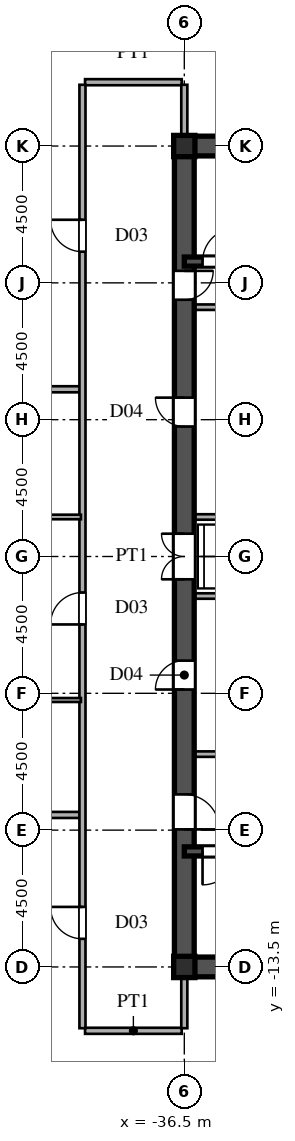
"""IFC4 building model, lengths in metres.
Left out: names, types, materials, properties, quantities, classifications, styles, units other than length and angle.
Written with IfcOpenShell. Run it as: python <this file> out.ifc"""

import sys

from ifc_helpers import new_model, si_unit, direction, frame, frame_2d, origin, origin_2d, place, context, subcontext, project, spatial, rectangle, i_section, extrude, source, transform, mapped, element, fill, save


model = new_model("IFC4")
c1 = context("Model", 3, precision=1e-05, world=origin(), true_north=direction((0.0, 1.0)))
c2 = subcontext(c1, "Body", "Model", "MODEL_VIEW")
j1 = project(units=[si_unit("LENGTHUNIT", "METRE"), si_unit("PLANEANGLEUNIT", "RADIAN")], contexts=[c1])
p1 = place(None, origin())
s1 = spatial("IfcSite", under=j1, at=p1, CompositionType="ELEMENT")
p2 = place(p1, origin())
s2 = spatial("IfcBuilding", under=s1, at=p2, CompositionType="ELEMENT")
p3 = place(p2, frame((0.0, 0.0, 132.0)))
s3 = spatial("IfcBuildingStorey", under=s2, at=p3, CompositionType="ELEMENT", Elevation=132.0)
m1 = source(origin(), c2, "Body", "SweptSolid", [
    extrude(i_section(OverallWidth=0.7, OverallDepth=0.7, WebThickness=0.028, FlangeThickness=0.045, at=origin_2d()), origin(), (0.0, 0.0, 1.0), 3.6),
])
for number, where, z_axis, x_axis in (
    (1, (-36.5, -13.5, 0.0), (0.0, 0.0, 1.0), (1.0, 0.0, 0.0)),
    (2, (-36.5, 13.5, 0.0), (0.0, 0.0, 1.0), (1.0, 0.0, 0.0)),
):
    element("IfcColumn", number, at=place(p3, frame(where, z_axis=z_axis, x_axis=x_axis)), inside=s3, PredefinedType="COLUMN", context=c2, shape_type="MappedRepresentation", body=[
        mapped(m1, transform((0.0, 0.0, 0.0), scale=1.0)),
    ])
for number, where, z_axis, x_axis in (
    (3, (-36.5, -13.5, 0.0), (0.0, 0.0, 1.0), (1.0, 0.0, 0.0)),
    (4, (-36.5, 13.5, 0.0), (0.0, 0.0, 1.0), (1.0, 0.0, 0.0)),
):
    element("IfcWall", number, at=place(p3, frame(where, z_axis=z_axis, x_axis=x_axis)), inside=s3, PredefinedType="SHEAR", context=c2, shape_type="SweptSolid", body=[
        extrude(rectangle(XDim=9.0, YDim=0.65, at=frame_2d((4.5, 0.0))), origin(), (0.0, 0.0, 1.0), 3.34),
    ])
p4 = place(p3, frame((-36.5, -13.65, 0.0), z_axis=(0.0, 0.0, 1.0), x_axis=(0.0, 1.0, 0.0)))
e5 = element("IfcWall", 5, at=p4, inside=s3, PredefinedType="SHEAR", context=c2, shape_type="SweptSolid", body=[
    extrude(rectangle(XDim=7.15, YDim=0.65, at=frame_2d((3.575, 0.0))), origin(), (0.0, 0.0, 1.0), 3.34),
])
p5 = place(p4, frame((4.675, 0.0, 0.0)))
e6 = element("IfcOpeningElement", 6, at=p5, cuts=e5, PredefinedType="OPENING", context=c2, shape_type="SweptSolid", body=[
    extrude(rectangle(XDim=1.15, YDim=2.2, at=frame_2d((0.575, 1.1))), frame((0.0, 0.335, 0.0), z_axis=(0.0, -1.0, 0.0), x_axis=(1.0, 0.0, 0.0)), (0.0, 0.0, 1.0), 0.67),
])
p6 = place(p3, frame((-36.5, -1.3, 0.0), z_axis=(0.0, 0.0, 1.0), x_axis=(0.0, 1.0, 0.0)))
e7 = element("IfcWall", 7, at=p6, inside=s3, PredefinedType="SHEAR", context=c2, shape_type="SweptSolid", body=[
    extrude(rectangle(XDim=2.6, YDim=0.65, at=frame_2d((1.3, 0.0))), origin(), (0.0, 0.0, 1.0), 3.34),
])
p7 = place(p6, frame((0.55, 0.0, 0.0)))
e8 = element("IfcOpeningElement", 8, at=p7, cuts=e7, PredefinedType="OPENING", context=c2, shape_type="SweptSolid", body=[
    extrude(rectangle(XDim=1.5, YDim=2.3, at=frame_2d((0.75, 1.15))), frame((0.0, 0.335, 0.0), z_axis=(0.0, -1.0, 0.0), x_axis=(1.0, 0.0, 0.0)), (0.0, 0.0, 1.0), 0.67),
])
p8 = place(p3, frame((-36.5, 8.2, 0.0), z_axis=(0.0, 0.0, 1.0), x_axis=(0.0, 1.0, 0.0)))
e9 = element("IfcWall", 9, at=p8, inside=s3, PredefinedType="SHEAR", context=c2, shape_type="SweptSolid", body=[
    extrude(rectangle(XDim=5.45, YDim=0.65, at=frame_2d((2.725, 0.0))), origin(), (0.0, 0.0, 1.0), 3.34),
])
p9 = place(p8, frame((0.245, 0.0, 0.0)))
e10 = element("IfcOpeningElement", 10, at=p9, cuts=e9, PredefinedType="OPENING", context=c2, shape_type="SweptSolid", body=[
    extrude(rectangle(XDim=0.95, YDim=2.15, at=frame_2d((0.475, 1.075))), frame((0.0, 0.335, 0.0), z_axis=(0.0, -1.0, 0.0), x_axis=(1.0, 0.0, 0.0)), (0.0, 0.0, 1.0), 0.67),
])
p10 = place(p3, frame((-36.5, -6.5, 0.0), z_axis=(0.0, 0.0, 1.0), x_axis=(0.0, 1.0, 0.0)))
e11 = element("IfcWall", 11, at=p10, inside=s3, PredefinedType="SHEAR", context=c2, shape_type="SweptSolid", body=[
    extrude(rectangle(XDim=5.2, YDim=0.65, at=frame_2d((2.6, 0.0))), origin(), (0.0, 0.0, 1.0), 3.34),
])
p11 = place(p10, frame((2.125, 0.0, 0.0)))
e12 = element("IfcOpeningElement", 12, at=p11, cuts=e11, PredefinedType="OPENING", context=c2, shape_type="SweptSolid", body=[
    extrude(rectangle(XDim=0.95, YDim=2.15, at=frame_2d((0.475, 1.075))), frame((0.0, 0.335, 0.0), z_axis=(0.0, -1.0, 0.0), x_axis=(1.0, 0.0, 0.0)), (0.0, 0.0, 1.0), 0.67),
])
p12 = place(p3, frame((-36.5, 1.3, 0.0), z_axis=(0.0, 0.0, 1.0), x_axis=(0.0, 1.0, 0.0)))
e13 = element("IfcWall", 13, at=p12, inside=s3, PredefinedType="SHEAR", context=c2, shape_type="SweptSolid", body=[
    extrude(rectangle(XDim=6.9, YDim=0.65, at=frame_2d((3.45, 0.0))), origin(), (0.0, 0.0, 1.0), 3.34),
])
p13 = place(p12, frame((2.975, 0.0, 0.0)))
e14 = element("IfcOpeningElement", 14, at=p13, cuts=e13, PredefinedType="OPENING", context=c2, shape_type="SweptSolid", body=[
    extrude(rectangle(XDim=0.95, YDim=2.15, at=frame_2d((0.475, 1.075))), frame((0.0, 0.335, 0.0), z_axis=(0.0, -1.0, 0.0), x_axis=(1.0, 0.0, 0.0)), (0.0, 0.0, 1.0), 0.67),
])
p14 = place(p3, frame((-36.5, -9.7, 0.0), z_axis=(0.0, 0.0, 1.0), x_axis=(1.0, 0.0, 0.0)))
e15 = element("IfcWall", 15, at=p14, inside=s3, PredefinedType="SHEAR", context=c2, shape_type="SweptSolid", body=[
    extrude(rectangle(XDim=9.0, YDim=0.3, at=frame_2d((4.5, 0.0))), origin(), (0.0, 0.0, 1.0), 3.34),
])
p15 = place(p14, frame((0.6, 0.0, 0.0)))
e16 = element("IfcOpeningElement", 16, at=p15, cuts=e15, PredefinedType="OPENING", context=c2, shape_type="SweptSolid", body=[
    extrude(rectangle(XDim=1.1, YDim=2.2, at=frame_2d((0.55, 1.1))), frame((0.0, 0.16, 0.0), z_axis=(0.0, -1.0, 0.0), x_axis=(1.0, 0.0, 0.0)), (0.0, 0.0, 1.0), 0.32),
])
p16 = place(p3, frame((-36.5, 9.7, 0.0), z_axis=(0.0, 0.0, 1.0), x_axis=(1.0, 0.0, 0.0)))
e17 = element("IfcWall", 17, at=p16, inside=s3, PredefinedType="SHEAR", context=c2, shape_type="SweptSolid", body=[
    extrude(rectangle(XDim=9.0, YDim=0.3, at=frame_2d((4.5, 0.0))), origin(), (0.0, 0.0, 1.0), 3.34),
])
p17 = place(p16, frame((0.6, 0.0, 0.0)))
e18 = element("IfcOpeningElement", 18, at=p17, cuts=e17, PredefinedType="OPENING", context=c2, shape_type="SweptSolid", body=[
    extrude(rectangle(XDim=1.1, YDim=2.2, at=frame_2d((0.55, 1.1))), frame((0.0, 0.16, 0.0), z_axis=(0.0, -1.0, 0.0), x_axis=(1.0, 0.0, 0.0)), (0.0, 0.0, 1.0), 0.32),
])
for number, where, z_axis, x_axis in (
    (19, (-36.15, -6.5, 0.0), (0.0, 0.0, 1.0), (1.0, 0.0, 0.0)),
    (20, (-36.15, 8.2, 0.0), (0.0, 0.0, 1.0), (1.0, 0.0, 0.0)),
):
    element("IfcWall", number, at=place(p3, frame(where, z_axis=z_axis, x_axis=x_axis)), inside=s3, PredefinedType="PARTITIONING", context=c2, shape_type="SweptSolid", body=[
        extrude(rectangle(XDim=5.7, YDim=0.18, at=frame_2d((2.85, 0.0))), origin(), (0.0, 0.0, 1.0), 3.34),
    ])
for number, where, z_axis, x_axis in (
    (21, (-36.15, -1.3, 0.0), (0.0, 0.0, 1.0), (1.0, 0.0, 0.0)),
    (22, (-36.15, 1.3, 0.0), (0.0, 0.0, 1.0), (1.0, 0.0, 0.0)),
):
    element("IfcWall", number, at=place(p3, frame(where, z_axis=z_axis, x_axis=x_axis)), inside=s3, PredefinedType="PARTITIONING", context=c2, shape_type="SweptSolid", body=[
        extrude(rectangle(XDim=2.95, YDim=0.18, at=frame_2d((1.475, 0.0))), origin(), (0.0, 0.0, 1.0), 3.34),
    ])
p18 = place(p3, frame((-39.765, -15.6, 0.0), z_axis=(0.0, 0.0, 1.0), x_axis=(1.0, 0.0, 0.0)))
e23 = element("IfcWall", 23, at=p18, inside=s3, PredefinedType="PARTITIONING", context=c2, shape_type="SweptSolid", body=[
    extrude(rectangle(XDim=3.18, YDim=0.2, at=frame_2d((1.59, 0.0))), origin(), (0.0, 0.0, 1.0), 3.34),
])
p19 = place(p3, frame((-62.69, -8.5, 0.0), z_axis=(0.0, 0.0, 1.0), x_axis=(1.0, 0.0, 0.0)))
e24 = element("IfcWall", 24, at=p19, inside=s3, PredefinedType="PARTITIONING", context=c2, shape_type="SweptSolid", body=[
    extrude(rectangle(XDim=22.76, YDim=0.2, at=frame_2d((11.38, 0.0))), origin(), (0.0, 0.0, 1.0), 3.34),
])
p20 = place(p3, frame((-45.45, -4.72, 0.0), z_axis=(0.0, 0.0, 1.0), x_axis=(1.0, 0.0, 0.0)))
e25 = element("IfcWall", 25, at=p20, inside=s3, PredefinedType="PARTITIONING", context=c2, shape_type="SweptSolid", body=[
    extrude(rectangle(XDim=5.55, YDim=0.13, at=frame_2d((2.775, 0.0))), origin(), (0.0, 0.0, 1.0), 3.34),
])
p21 = place(p20, frame((2.335, 0.0, 0.0)))
e26 = element("IfcOpeningElement", 26, at=p21, cuts=e25, PredefinedType="OPENING", context=c2, shape_type="SweptSolid", body=[
    extrude(rectangle(XDim=0.88, YDim=2.1, at=frame_2d((0.44, 1.05))), frame((0.0, 0.075, 0.0), z_axis=(0.0, -1.0, 0.0), x_axis=(1.0, 0.0, 0.0)), (0.0, 0.0, 1.0), 0.15),
])
p22 = place(p3, frame((-45.45, 1.3, 0.0), z_axis=(0.0, 0.0, 1.0), x_axis=(1.0, 0.0, 0.0)))
e27 = element("IfcWall", 27, at=p22, inside=s3, PredefinedType="PARTITIONING", context=c2, shape_type="SweptSolid", body=[
    extrude(rectangle(XDim=5.55, YDim=0.15, at=frame_2d((2.775, 0.0))), origin(), (0.0, 0.0, 1.0), 3.34),
])
p23 = place(p22, frame((2.3, 0.0, 0.0)))
e28 = element("IfcOpeningElement", 28, at=p23, cuts=e27, PredefinedType="OPENING", context=c2, shape_type="SweptSolid", body=[
    extrude(rectangle(XDim=0.95, YDim=2.15, at=frame_2d((0.475, 1.075))), frame((0.0, 0.085, 0.0), z_axis=(0.0, -1.0, 0.0), x_axis=(1.0, 0.0, 0.0)), (0.0, 0.0, 1.0), 0.17),
])
p24 = place(p3, frame((-68.458, 5.5, 0.0), z_axis=(0.0, 0.0, 1.0), x_axis=(1.0, 0.0, 0.0)))
e29 = element("IfcWall", 29, at=p24, inside=s3, PredefinedType="PARTITIONING", context=c2, shape_type="SweptSolid", body=[
    extrude(rectangle(XDim=28.529, YDim=0.2, at=frame_2d((14.264, 0.0))), origin(), (0.0, 0.0, 1.0), 3.34),
])
p25 = place(p3, frame((-39.765, 15.6, 0.0), z_axis=(0.0, 0.0, 1.0), x_axis=(1.0, 0.0, 0.0)))
e30 = element("IfcWall", 30, at=p25, inside=s3, PredefinedType="PARTITIONING", context=c2, shape_type="SweptSolid", body=[
    extrude(rectangle(XDim=3.18, YDim=0.2, at=frame_2d((1.59, 0.0))), origin(), (0.0, 0.0, 1.0), 3.34),
])
p26 = place(p3, frame((-39.85, -15.515, 0.0), z_axis=(0.0, 0.0, 1.0), x_axis=(0.0, 1.0, 0.0)))
e31 = element("IfcWall", 31, at=p26, inside=s3, PredefinedType="PARTITIONING", context=c2, shape_type="SweptSolid", body=[
    extrude(rectangle(XDim=31.03, YDim=0.2, at=frame_2d((15.515, 0.0))), origin(), (0.0, 0.0, 1.0), 3.34),
])
p27 = place(p26, frame((2.94, 0.0, 0.0)))
e32 = element("IfcOpeningElement", 32, at=p27, cuts=e31, PredefinedType="OPENING", context=c2, shape_type="SweptSolid", body=[
    extrude(rectangle(XDim=1.05, YDim=2.25, at=frame_2d((0.525, 1.125))), frame((0.0, 0.11, 0.0), z_axis=(0.0, -1.0, 0.0), x_axis=(1.0, 0.0, 0.0)), (0.0, 0.0, 1.0), 0.22),
])
p28 = place(p26, frame((13.28, 0.0, 0.0)))
e33 = element("IfcOpeningElement", 33, at=p28, cuts=e31, PredefinedType="OPENING", context=c2, shape_type="SweptSolid", body=[
    extrude(rectangle(XDim=1.05, YDim=2.25, at=frame_2d((0.525, 1.125))), frame((0.0, 0.11, 0.0), z_axis=(0.0, -1.0, 0.0), x_axis=(1.0, 0.0, 0.0)), (0.0, 0.0, 1.0), 0.22),
])
p29 = place(p26, frame((25.54, 0.0, 0.0)))
e34 = element("IfcOpeningElement", 34, at=p29, cuts=e31, PredefinedType="OPENING", context=c2, shape_type="SweptSolid", body=[
    extrude(rectangle(XDim=1.05, YDim=2.25, at=frame_2d((0.525, 1.125))), frame((0.0, 0.11, 0.0), z_axis=(0.0, -1.0, 0.0), x_axis=(1.0, 0.0, 0.0)), (0.0, 0.0, 1.0), 0.22),
])
for number, where, z_axis, x_axis in (
    (35, (-36.5, -15.515, 0.0), (0.0, 0.0, 1.0), (0.0, 1.0, 0.0)),
    (36, (-36.5, 13.83, 0.0), (0.0, 0.0, 1.0), (0.0, 1.0, 0.0)),
):
    element("IfcWall", number, at=place(p3, frame(where, z_axis=z_axis, x_axis=x_axis)), inside=s3, PredefinedType="PARTITIONING", context=c2, shape_type="SweptSolid", body=[
        extrude(rectangle(XDim=1.685, YDim=0.2, at=frame_2d((0.842, 0.0))), origin(), (0.0, 0.0, 1.0), 2.44),
    ])
m2 = source(origin(), c2, "Body", "SweptSolid", [
    extrude(rectangle(XDim=1.15, YDim=2.2, at=frame_2d((0.575, 1.1))), frame((0.0, 0.025, 0.0), z_axis=(0.0, -1.0, 0.0), x_axis=(1.0, 0.0, 0.0)), (0.0, 0.0, 1.0), 0.05),
])
p30 = place(p5, frame((1.15, 0.0, 0.0), z_axis=(0.0, 0.0, 1.0), x_axis=(-1.0, 0.0, 0.0)))
e37 = element("IfcDoor", 37, at=p30, inside=s3, OperationType="SINGLE_SWING_LEFT", PredefinedType="DOOR", context=c2, shape_type="MappedRepresentation", body=[
    mapped(m2, transform((0.0, 0.0, 0.0), scale=1.0)),
])
fill(e6, e37)
m3 = source(origin(), c2, "Body", "SweptSolid", [
    extrude(rectangle(XDim=1.5, YDim=2.3, at=frame_2d((0.75, 1.15))), frame((0.0, 0.025, 0.0), z_axis=(0.0, -1.0, 0.0), x_axis=(1.0, 0.0, 0.0)), (0.0, 0.0, 1.0), 0.05),
])
p31 = place(p7, origin())
e38 = element("IfcDoor", 38, at=p31, inside=s3, OperationType="DOUBLE_SWING_LEFT", PredefinedType="DOOR", context=c2, shape_type="MappedRepresentation", body=[
    mapped(m3, transform((0.0, 0.0, 0.0), scale=1.0)),
])
fill(e8, e38)
m4 = source(origin(), c2, "Body", "SweptSolid", [
    extrude(rectangle(XDim=0.95, YDim=2.15, at=frame_2d((0.475, 1.075))), frame((0.0, 0.025, 0.0), z_axis=(0.0, -1.0, 0.0), x_axis=(1.0, 0.0, 0.0)), (0.0, 0.0, 1.0), 0.05),
])
p32 = place(p9, frame((0.95, 0.0, 0.0), z_axis=(0.0, 0.0, 1.0), x_axis=(-1.0, 0.0, 0.0)))
e39 = element("IfcDoor", 39, at=p32, inside=s3, OperationType="SINGLE_SWING_RIGHT", PredefinedType="DOOR", context=c2, shape_type="MappedRepresentation", body=[
    mapped(m4, transform((0.0, 0.0, 0.0), scale=1.0)),
])
fill(e10, e39)
p33 = place(p11, origin())
e40 = element("IfcDoor", 40, at=p33, inside=s3, OperationType="SINGLE_SWING_LEFT", PredefinedType="DOOR", context=c2, shape_type="MappedRepresentation", body=[
    mapped(m4, transform((0.0, 0.0, 0.0), scale=1.0)),
])
fill(e12, e40)
p34 = place(p13, origin())
e41 = element("IfcDoor", 41, at=p34, inside=s3, OperationType="SINGLE_SWING_RIGHT", PredefinedType="DOOR", context=c2, shape_type="MappedRepresentation", body=[
    mapped(m4, transform((0.0, 0.0, 0.0), scale=1.0)),
])
fill(e14, e41)
m5 = source(origin(), c2, "Body", "SweptSolid", [
    extrude(rectangle(XDim=1.1, YDim=2.2, at=frame_2d((0.55, 1.1))), frame((0.0, 0.025, 0.0), z_axis=(0.0, -1.0, 0.0), x_axis=(1.0, 0.0, 0.0)), (0.0, 0.0, 1.0), 0.05),
])
p35 = place(p15, frame((1.1, 0.0, 0.0), z_axis=(0.0, 0.0, 1.0), x_axis=(-1.0, 0.0, 0.0)))
e42 = element("IfcDoor", 42, at=p35, inside=s3, OperationType="SINGLE_SWING_LEFT", PredefinedType="DOOR", context=c2, shape_type="MappedRepresentation", body=[
    mapped(m5, transform((0.0, 0.0, 0.0), scale=1.0)),
])
fill(e16, e42)
p36 = place(p17, origin())
e43 = element("IfcDoor", 43, at=p36, inside=s3, OperationType="SINGLE_SWING_RIGHT", PredefinedType="DOOR", context=c2, shape_type="MappedRepresentation", body=[
    mapped(m5, transform((0.0, 0.0, 0.0), scale=1.0)),
])
fill(e18, e43)
m6 = source(origin(), c2, "Body", "SweptSolid", [
    extrude(rectangle(XDim=1.05, YDim=2.25, at=frame_2d((0.525, 1.125))), frame((0.0, 0.025, 0.0), z_axis=(0.0, -1.0, 0.0), x_axis=(1.0, 0.0, 0.0)), (0.0, 0.0, 1.0), 0.05),
])
p37 = place(p27, origin())
e44 = element("IfcDoor", 44, at=p37, inside=s3, OperationType="SINGLE_SWING_RIGHT", PredefinedType="DOOR", context=c2, shape_type="MappedRepresentation", body=[
    mapped(m6, transform((0.0, 0.0, 0.0), scale=1.0)),
])
fill(e32, e44)
p38 = place(p28, origin())
e45 = element("IfcDoor", 45, at=p38, inside=s3, OperationType="SINGLE_SWING_LEFT", PredefinedType="DOOR", context=c2, shape_type="MappedRepresentation", body=[
    mapped(m6, transform((0.0, 0.0, 0.0), scale=1.0)),
])
fill(e33, e45)
p39 = place(p29, origin())
e46 = element("IfcDoor", 46, at=p39, inside=s3, OperationType="SINGLE_SWING_RIGHT", PredefinedType="DOOR", context=c2, shape_type="MappedRepresentation", body=[
    mapped(m6, transform((0.0, 0.0, 0.0), scale=1.0)),
])
fill(e34, e46)
save(model, sys.argv[1])
